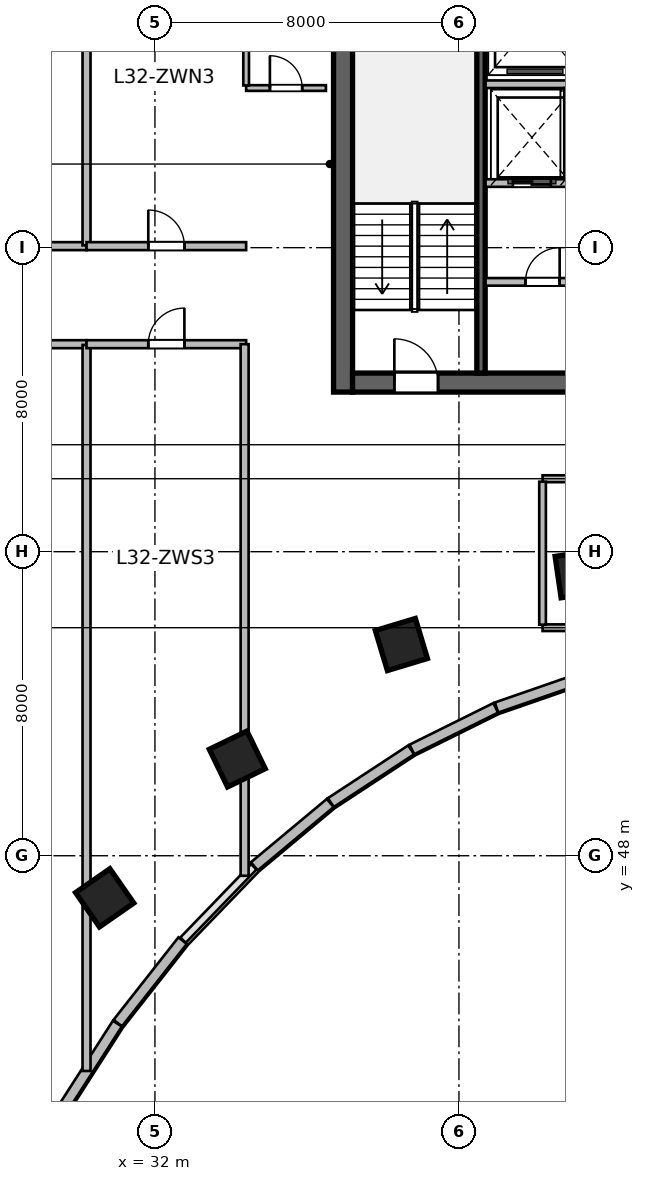
"""IFC4 building model, lengths in metres.
Left out: names, types, materials, properties, quantities, classifications, styles, units other than length and angle.
Written with IfcOpenShell. Run it as: python <this file> out.ifc"""

import sys

from ifc_helpers import new_model, si_unit, direction, frame, frame_2d, origin, origin_2d, place, context, subcontext, project, spatial, rectangle, extrude, source, transform, mapped, element, fill, save


model = new_model("IFC4")
c1 = context("Model", 3, precision=1e-05, world=origin(), true_north=direction((0.0, 1.0)))
c2 = subcontext(c1, "Body", "Model", "MODEL_VIEW")
j1 = project(units=[si_unit("LENGTHUNIT", "METRE"), si_unit("PLANEANGLEUNIT", "RADIAN")], contexts=[c1])
p1 = place(None, origin())
s1 = spatial("IfcSite", under=j1, at=p1, CompositionType="ELEMENT")
p2 = place(p1, origin())
s2 = spatial("IfcBuilding", under=s1, at=p2, CompositionType="ELEMENT")
p3 = place(p2, frame((0.0, 0.0, 135.0)))
s3 = spatial("IfcBuildingStorey", under=s2, at=p3, CompositionType="ELEMENT", Elevation=135.0)
m1 = source(origin(), c2, "Body", "SweptSolid", [
    extrude(rectangle(XDim=12.0, YDim=0.5, at=frame_2d((6.0, 0.0))), origin(), (0.0, 0.0, 1.0), 3.9),
])
p4 = place(p3, frame((36.95, 60.2, 0.0), z_axis=(0.0, 0.0, 1.0), x_axis=(0.0, 1.0, 0.0)))
e1 = element("IfcWall", 1, at=p4, inside=s3, PredefinedType="SHEAR", context=c2, shape_type="MappedRepresentation", body=[
    mapped(m1, transform((0.0, 0.0, 0.0), scale=1.0)),
])
m2 = source(origin(), c2, "Body", "SweptSolid", [
    extrude(rectangle(XDim=21.6, YDim=0.5, at=frame_2d((10.8, 0.0))), origin(), (0.0, 0.0, 1.0), 3.9),
])
p5 = place(p3, frame((37.2, 60.45, 0.0), z_axis=(0.0, 0.0, 1.0), x_axis=(1.0, 0.0, 0.0)))
e2 = element("IfcWall", 2, at=p5, inside=s3, PredefinedType="SHEAR", context=c2, shape_type="MappedRepresentation", body=[
    mapped(m2, transform((0.0, 0.0, 0.0), scale=1.0)),
])
p6 = place(p5, frame((1.1, 0.0, 0.0)))
e3 = element("IfcOpeningElement", 3, at=p6, cuts=e2, PredefinedType="OPENING", context=c2, shape_type="SweptSolid", body=[
    extrude(rectangle(XDim=1.15, YDim=2.15, at=frame_2d((0.575, 1.075))), frame((0.0, 0.26, 0.0), z_axis=(0.0, -1.0, 0.0), x_axis=(1.0, 0.0, 0.0)), (0.0, 0.0, 1.0), 0.52),
])
p7 = place(p5, frame((19.5, 0.0, 0.0)))
e4 = element("IfcOpeningElement", 4, at=p7, cuts=e2, PredefinedType="OPENING", context=c2, shape_type="SweptSolid", body=[
    extrude(rectangle(XDim=0.9, YDim=2.1, at=frame_2d((0.45, 1.05))), frame((0.0, 0.26, 0.0), z_axis=(0.0, -1.0, 0.0), x_axis=(1.0, 0.0, 0.0)), (0.0, 0.0, 1.0), 0.52),
])
p8 = place(p5, frame((12.02, 0.0, 0.0)))
e5 = element("IfcOpeningElement", 5, at=p8, cuts=e2, PredefinedType="OPENING", context=c2, shape_type="SweptSolid", body=[
    extrude(rectangle(XDim=1.6, YDim=2.15, at=frame_2d((0.8, 1.075))), frame((0.0, 0.26, 0.0), z_axis=(0.0, -1.0, 0.0), x_axis=(1.0, 0.0, 0.0)), (0.0, 0.0, 1.0), 0.52),
])
m3 = source(origin(), c2, "Body", "SweptSolid", [
    extrude(rectangle(XDim=11.0, YDim=0.22, at=frame_2d((5.5, 0.0))), origin(), (0.0, 0.0, 1.0), 3.9),
])
p9 = place(p3, frame((40.58, 60.7, 0.0), z_axis=(0.0, 0.0, 1.0), x_axis=(0.0, 1.0, 0.0)))
e6 = element("IfcWall", 6, at=p9, inside=s3, PredefinedType="SHEAR", context=c2, shape_type="MappedRepresentation", body=[
    mapped(m3, transform((0.0, 0.0, 0.0), scale=1.0)),
])
m4 = source(origin(), c2, "Body", "SweptSolid", [
    extrude(rectangle(XDim=1.1, YDim=1.1, at=origin_2d()), origin(), (0.0, 0.0, 1.0), 3.9),
])
for number, where, z_axis, x_axis in (
    (7, (30.677, 46.892, 0.0), (0.0, 0.0, 1.0), (-0.571, 0.821, 0.0)),
    (8, (34.166, 50.545, 0.0), (0.0, 0.0, 1.0), (-0.436, 0.9, 0.0)),
    (9, (38.485, 53.558, 0.0), (0.0, 0.0, 1.0), (-0.289, 0.957, 0.0)),
    (10, (43.154, 55.411, 0.0), (0.0, 0.0, 1.0), (-0.143, 0.99, 0.0)),
):
    element("IfcColumn", number, at=place(p3, frame(where, z_axis=z_axis, x_axis=x_axis)), inside=s3, PredefinedType="COLUMN", context=c2, shape_type="MappedRepresentation", body=[
        mapped(m4, transform((0.0, 0.0, 0.0), scale=1.0)),
    ])
m5 = source(origin(), c2, "Body", "SweptSolid", [
    extrude(rectangle(XDim=2.411, YDim=0.28, at=frame_2d((1.205, 0.0))), origin(), (0.0, 0.0, 1.0), 3.65),
])
p10 = place(p3, frame((43.266, 52.689, 0.0), z_axis=(0.0, 0.0, 1.0), x_axis=(-0.944880068161, -0.327416640982, 0.0)))
e11 = element("IfcWall", 11, at=p10, inside=s3, PredefinedType="SOLIDWALL", context=c2, shape_type="MappedRepresentation", body=[
    mapped(m5, transform((0.0, 0.0, 0.0), scale=1.0)),
])
m6 = source(origin(), c2, "Body", "SweptSolid", [
    extrude(rectangle(XDim=2.462, YDim=0.28, at=frame_2d((1.231, 0.0))), origin(), (0.0, 0.0, 1.0), 3.65),
])
p11 = place(p3, frame((40.967, 51.891, 0.0), z_axis=(0.0, 0.0, 1.0), x_axis=(-0.8959882207, -0.444077817917, 0.0)))
e12 = element("IfcWall", 12, at=p11, inside=s3, PredefinedType="SOLIDWALL", context=c2, shape_type="MappedRepresentation", body=[
    mapped(m6, transform((0.0, 0.0, 0.0), scale=1.0)),
])
m7 = source(origin(), c2, "Body", "SweptSolid", [
    extrude(rectangle(XDim=2.527, YDim=0.28, at=frame_2d((1.264, 0.0))), origin(), (0.0, 0.0, 1.0), 3.65),
])
p12 = place(p3, frame((38.742, 50.786, 0.0), z_axis=(0.0, 0.0, 1.0), x_axis=(-0.836011905051, -0.548711303523, 0.0)))
e13 = element("IfcWall", 13, at=p12, inside=s3, PredefinedType="SOLIDWALL", context=c2, shape_type="MappedRepresentation", body=[
    mapped(m7, transform((0.0, 0.0, 0.0), scale=1.0)),
])
m8 = source(origin(), c2, "Body", "SweptSolid", [
    extrude(rectangle(XDim=2.601, YDim=0.28, at=frame_2d((1.3, 0.0))), origin(), (0.0, 0.0, 1.0), 3.65),
])
p13 = place(p3, frame((36.613, 49.387, 0.0), z_axis=(0.0, 0.0, 1.0), x_axis=(-0.76796730295, -0.640489048775, 0.0)))
e14 = element("IfcWall", 14, at=p13, inside=s3, PredefinedType="SOLIDWALL", context=c2, shape_type="MappedRepresentation", body=[
    mapped(m8, transform((0.0, 0.0, 0.0), scale=1.0)),
])
m9 = source(origin(), c2, "Body", "SweptSolid", [
    extrude(rectangle(XDim=2.76, YDim=0.28, at=frame_2d((1.38, 0.0))), origin(), (0.0, 0.0, 1.0), 3.65),
])
p14 = place(p3, frame((32.728, 45.766, 0.0), z_axis=(0.0, 0.0, 1.0), x_axis=(-0.618180818641, -0.786035925047, 0.0)))
e15 = element("IfcWall", 15, at=p14, inside=s3, PredefinedType="SOLIDWALL", context=c2, shape_type="MappedRepresentation", body=[
    mapped(m9, transform((0.0, 0.0, 0.0), scale=1.0)),
])
m10 = source(origin(), c2, "Body", "SweptSolid", [
    extrude(rectangle(XDim=2.84, YDim=0.28, at=frame_2d((1.42, 0.0))), origin(), (0.0, 0.0, 1.0), 3.65),
])
p15 = place(p3, frame((31.011, 43.582, 0.0), z_axis=(0.0, 0.0, 1.0), x_axis=(-0.540214368057, -0.841527442538, 0.0)))
e16 = element("IfcWall", 16, at=p15, inside=s3, PredefinedType="SOLIDWALL", context=c2, shape_type="MappedRepresentation", body=[
    mapped(m10, transform((0.0, 0.0, 0.0), scale=1.0)),
])
m11 = source(origin(), c2, "Body", "SweptSolid", [
    extrude(rectangle(XDim=8.8, YDim=0.2, at=frame_2d((4.4, 0.0))), origin(), (0.0, 0.0, 1.0), 3.65),
])
p16 = place(p3, frame((40.7, 68.3, 0.0), z_axis=(0.0, 0.0, 1.0), x_axis=(1.0, 0.0, 0.0)))
e17 = element("IfcWall", 17, at=p16, inside=s3, PredefinedType="SOLIDWALL", context=c2, shape_type="MappedRepresentation", body=[
    mapped(m11, transform((0.0, 0.0, 0.0), scale=1.0)),
])
m12 = source(origin(), c2, "Body", "SweptSolid", [
    extrude(rectangle(XDim=8.02, YDim=0.2, at=frame_2d((4.01, 0.0))), origin(), (0.0, 0.0, 1.0), 3.65),
])
p17 = place(p3, frame((40.7, 63.1, 0.0), z_axis=(0.0, 0.0, 1.0), x_axis=(1.0, 0.0, 0.0)))
e18 = element("IfcWall", 18, at=p17, inside=s3, PredefinedType="SOLIDWALL", context=c2, shape_type="MappedRepresentation", body=[
    mapped(m12, transform((0.0, 0.0, 0.0), scale=1.0)),
])
p18 = place(p17, frame((1.05, 0.0, 0.0)))
e19 = element("IfcOpeningElement", 19, at=p18, cuts=e18, PredefinedType="OPENING", context=c2, shape_type="SweptSolid", body=[
    extrude(rectangle(XDim=0.9, YDim=2.1, at=frame_2d((0.45, 1.05))), frame((0.0, 0.11, 0.0), z_axis=(0.0, -1.0, 0.0), x_axis=(1.0, 0.0, 0.0)), (0.0, 0.0, 1.0), 0.22),
])
p19 = place(p17, frame((4.99, 0.0, 0.0)))
e20 = element("IfcOpeningElement", 20, at=p19, cuts=e18, PredefinedType="OPENING", context=c2, shape_type="SweptSolid", body=[
    extrude(rectangle(XDim=0.9, YDim=2.1, at=frame_2d((0.45, 1.05))), frame((0.0, 0.11, 0.0), z_axis=(0.0, -1.0, 0.0), x_axis=(1.0, 0.0, 0.0)), (0.0, 0.0, 1.0), 0.22),
])
p20 = place(p3, frame((40.7, 65.7, 0.0), z_axis=(0.0, 0.0, 1.0), x_axis=(1.0, 0.0, 0.0)))
e21 = element("IfcWall", 21, at=p20, inside=s3, PredefinedType="SOLIDWALL", context=c2, shape_type="MappedRepresentation", body=[
    mapped(m11, transform((0.0, 0.0, 0.0), scale=1.0)),
])
p21 = place(p20, frame((0.72, 0.0, 0.0)))
e22 = element("IfcOpeningElement", 22, at=p21, cuts=e21, PredefinedType="OPENING", context=c2, shape_type="SweptSolid", body=[
    extrude(rectangle(XDim=1.0, YDim=2.15, at=frame_2d((0.5, 1.075))), frame((0.0, 0.11, 0.0), z_axis=(0.0, -1.0, 0.0), x_axis=(1.0, 0.0, 0.0)), (0.0, 0.0, 1.0), 0.22),
])
p22 = place(p20, frame((2.62, 0.0, 0.0)))
e23 = element("IfcOpeningElement", 23, at=p22, cuts=e21, PredefinedType="OPENING", context=c2, shape_type="SweptSolid", body=[
    extrude(rectangle(XDim=1.0, YDim=2.15, at=frame_2d((0.5, 1.075))), frame((0.0, 0.11, 0.0), z_axis=(0.0, -1.0, 0.0), x_axis=(1.0, 0.0, 0.0)), (0.0, 0.0, 1.0), 0.22),
])
p23 = place(p20, frame((4.55, 0.0, 0.0)))
e24 = element("IfcOpeningElement", 24, at=p23, cuts=e21, PredefinedType="OPENING", context=c2, shape_type="SweptSolid", body=[
    extrude(rectangle(XDim=1.0, YDim=2.15, at=frame_2d((0.5, 1.075))), frame((0.0, 0.11, 0.0), z_axis=(0.0, -1.0, 0.0), x_axis=(1.0, 0.0, 0.0)), (0.0, 0.0, 1.0), 0.22),
])
p24 = place(p20, frame((6.55, 0.0, 0.0)))
e25 = element("IfcOpeningElement", 25, at=p24, cuts=e21, PredefinedType="OPENING", context=c2, shape_type="SweptSolid", body=[
    extrude(rectangle(XDim=1.0, YDim=2.15, at=frame_2d((0.5, 1.075))), frame((0.0, 0.11, 0.0), z_axis=(0.0, -1.0, 0.0), x_axis=(1.0, 0.0, 0.0)), (0.0, 0.0, 1.0), 0.22),
])
m13 = source(origin(), c2, "Body", "SweptSolid", [
    extrude(rectangle(XDim=2.4, YDim=0.2, at=frame_2d((1.2, 0.0))), origin(), (0.0, 0.0, 1.0), 3.65),
])
p25 = place(p3, frame((42.87, 65.8, 0.0), z_axis=(0.0, 0.0, 1.0), x_axis=(0.0, 1.0, 0.0)))
e26 = element("IfcWall", 26, at=p25, inside=s3, PredefinedType="SOLIDWALL", context=c2, shape_type="MappedRepresentation", body=[
    mapped(m13, transform((0.0, 0.0, 0.0), scale=1.0)),
])
m14 = source(origin(), c2, "Body", "SweptSolid", [
    extrude(rectangle(XDim=2.1, YDim=0.15, at=frame_2d((1.05, 0.0))), origin(), (0.0, 0.0, 1.0), 3.65),
])
p26 = place(p3, frame((34.4, 68.2, 0.0), z_axis=(0.0, 0.0, 1.0), x_axis=(1.0, 0.0, 0.0)))
e27 = element("IfcWall", 27, at=p26, inside=s3, PredefinedType="PARTITIONING", context=c2, shape_type="MappedRepresentation", body=[
    mapped(m14, transform((0.0, 0.0, 0.0), scale=1.0)),
])
p27 = place(p26, frame((0.625, 0.0, 0.0)))
e28 = element("IfcOpeningElement", 28, at=p27, cuts=e27, PredefinedType="OPENING", context=c2, shape_type="SweptSolid", body=[
    extrude(rectangle(XDim=0.85, YDim=2.1, at=frame_2d((0.425, 1.05))), frame((0.0, 0.085, 0.0), z_axis=(0.0, -1.0, 0.0), x_axis=(1.0, 0.0, 0.0)), (0.0, 0.0, 1.0), 0.17),
])
m15 = source(origin(), c2, "Body", "SweptSolid", [
    extrude(rectangle(XDim=3.845, YDim=0.15, at=frame_2d((1.922, 0.0))), origin(), (0.0, 0.0, 1.0), 3.65),
])
p28 = place(p3, frame((34.4, 68.268, 0.0), z_axis=(0.0, 0.0, 1.0), x_axis=(0.0, 1.0, 0.0)))
e29 = element("IfcWall", 29, at=p28, inside=s3, PredefinedType="PARTITIONING", context=c2, shape_type="MappedRepresentation", body=[
    mapped(m15, transform((0.0, 0.0, 0.0), scale=1.0)),
])
m16 = source(origin(), c2, "Body", "SweptSolid", [
    extrude(rectangle(XDim=4.176, YDim=0.175, at=frame_2d((2.088, 0.0))), origin(), (0.0, 0.0, 1.0), 3.65),
])
p29 = place(p3, frame((42.2, 54.0, 0.0), z_axis=(0.0, 0.0, 1.0), x_axis=(1.0, 0.0, 0.0)))
e30 = element("IfcWall", 30, at=p29, inside=s3, PredefinedType="PARTITIONING", context=c2, shape_type="MappedRepresentation", body=[
    mapped(m16, transform((0.0, 0.0, 0.0), scale=1.0)),
])
m17 = source(origin(), c2, "Body", "SweptSolid", [
    extrude(rectangle(XDim=4.176, YDim=0.18, at=frame_2d((2.088, 0.0))), origin(), (0.0, 0.0, 1.0), 3.65),
])
p30 = place(p3, frame((42.2, 57.92, 0.0), z_axis=(0.0, 0.0, 1.0), x_axis=(1.0, 0.0, 0.0)))
e31 = element("IfcWall", 31, at=p30, inside=s3, PredefinedType="PLUMBINGWALL", context=c2, shape_type="MappedRepresentation", body=[
    mapped(m17, transform((0.0, 0.0, 0.0), scale=1.0)),
])
p31 = place(p30, frame((1.638, 0.0, 0.0)))
e32 = element("IfcOpeningElement", 32, at=p31, cuts=e31, PredefinedType="OPENING", context=c2, shape_type="SweptSolid", body=[
    extrude(rectangle(XDim=0.9, YDim=2.08, at=frame_2d((0.45, 1.04))), frame((0.0, 0.1, 0.0), z_axis=(0.0, -1.0, 0.0), x_axis=(1.0, 0.0, 0.0)), (0.0, 0.0, 1.0), 0.2),
])
m18 = source(origin(), c2, "Body", "SweptSolid", [
    extrude(rectangle(XDim=3.763, YDim=0.175, at=frame_2d((1.881, 0.0))), origin(), (0.0, 0.0, 1.0), 3.65),
])
p32 = place(p3, frame((42.2, 54.079, 0.0), z_axis=(0.0, 0.0, 1.0), x_axis=(0.0, 1.0, 0.0)))
e33 = element("IfcWall", 33, at=p32, inside=s3, PredefinedType="PARTITIONING", context=c2, shape_type="MappedRepresentation", body=[
    mapped(m18, transform((0.0, 0.0, 0.0), scale=1.0)),
])
m19 = source(origin(), c2, "Body", "SweptSolid", [
    extrude(rectangle(XDim=4.0, YDim=0.21, at=frame_2d((2.0, 0.0))), origin(), (0.0, 0.0, 1.0), 3.65),
])
p33 = place(p3, frame((26.2, 64.04, 0.0), z_axis=(0.0, 0.0, 1.0), x_axis=(1.0, 0.0, 0.0)))
e34 = element("IfcWall", 34, at=p33, inside=s3, PredefinedType="PARTITIONING", context=c2, shape_type="MappedRepresentation", body=[
    mapped(m19, transform((0.0, 0.0, 0.0), scale=1.0)),
])
p34 = place(p33, frame((1.525, 0.0, 0.0)))
e35 = element("IfcOpeningElement", 35, at=p34, cuts=e34, PredefinedType="OPENING", context=c2, shape_type="SweptSolid", body=[
    extrude(rectangle(XDim=0.95, YDim=2.1, at=frame_2d((0.475, 1.05))), frame((0.0, 0.115, 0.0), z_axis=(0.0, -1.0, 0.0), x_axis=(1.0, 0.0, 0.0)), (0.0, 0.0, 1.0), 0.23),
])
m20 = source(origin(), c2, "Body", "SweptSolid", [
    extrude(rectangle(XDim=9.736, YDim=0.21, at=frame_2d((4.868, 0.0))), origin(), (0.0, 0.0, 1.0), 3.65),
])
p35 = place(p3, frame((30.2, 64.06, 0.0), z_axis=(0.0, 0.0, 1.0), x_axis=(0.0, 1.0, 0.0)))
e36 = element("IfcWall", 36, at=p35, inside=s3, PredefinedType="PARTITIONING", context=c2, shape_type="MappedRepresentation", body=[
    mapped(m20, transform((0.0, 0.0, 0.0), scale=1.0)),
])
m21 = source(origin(), c2, "Body", "SweptSolid", [
    extrude(rectangle(XDim=4.2, YDim=0.21, at=frame_2d((2.1, 0.0))), origin(), (0.0, 0.0, 1.0), 3.65),
])
p36 = place(p3, frame((30.2, 64.04, 0.0), z_axis=(0.0, 0.0, 1.0), x_axis=(1.0, 0.0, 0.0)))
e37 = element("IfcWall", 37, at=p36, inside=s3, PredefinedType="PARTITIONING", context=c2, shape_type="MappedRepresentation", body=[
    mapped(m21, transform((0.0, 0.0, 0.0), scale=1.0)),
])
p37 = place(p36, frame((1.625, 0.0, 0.0)))
e38 = element("IfcOpeningElement", 38, at=p37, cuts=e37, PredefinedType="OPENING", context=c2, shape_type="SweptSolid", body=[
    extrude(rectangle(XDim=0.95, YDim=2.1, at=frame_2d((0.475, 1.05))), frame((0.0, 0.115, 0.0), z_axis=(0.0, -1.0, 0.0), x_axis=(1.0, 0.0, 0.0)), (0.0, 0.0, 1.0), 0.23),
])
p38 = place(p3, frame((26.2, 61.46, 0.0), z_axis=(0.0, 0.0, 1.0), x_axis=(1.0, 0.0, 0.0)))
e39 = element("IfcWall", 39, at=p38, inside=s3, PredefinedType="PARTITIONING", context=c2, shape_type="MappedRepresentation", body=[
    mapped(m19, transform((0.0, 0.0, 0.0), scale=1.0)),
])
p39 = place(p38, frame((1.525, 0.0, 0.0)))
e40 = element("IfcOpeningElement", 40, at=p39, cuts=e39, PredefinedType="OPENING", context=c2, shape_type="SweptSolid", body=[
    extrude(rectangle(XDim=0.95, YDim=2.1, at=frame_2d((0.475, 1.05))), frame((0.0, 0.115, 0.0), z_axis=(0.0, -1.0, 0.0), x_axis=(1.0, 0.0, 0.0)), (0.0, 0.0, 1.0), 0.23),
])
m22 = source(origin(), c2, "Body", "SweptSolid", [
    extrude(rectangle(XDim=19.103, YDim=0.21, at=frame_2d((9.552, 0.0))), origin(), (0.0, 0.0, 1.0), 2.942),
])
p40 = place(p3, frame((30.2, 42.337, 0.0), z_axis=(0.0, 0.0, 1.0), x_axis=(0.0, 1.0, 0.0)))
e41 = element("IfcWall", 41, at=p40, inside=s3, PredefinedType="PARTITIONING", context=c2, shape_type="MappedRepresentation", body=[
    mapped(m22, transform((0.0, 0.0, 0.0), scale=1.0)),
])
p41 = place(p3, frame((30.2, 61.46, 0.0), z_axis=(0.0, 0.0, 1.0), x_axis=(1.0, 0.0, 0.0)))
e42 = element("IfcWall", 42, at=p41, inside=s3, PredefinedType="PARTITIONING", context=c2, shape_type="MappedRepresentation", body=[
    mapped(m21, transform((0.0, 0.0, 0.0), scale=1.0)),
])
p42 = place(p41, frame((1.625, 0.0, 0.0)))
e43 = element("IfcOpeningElement", 43, at=p42, cuts=e42, PredefinedType="OPENING", context=c2, shape_type="SweptSolid", body=[
    extrude(rectangle(XDim=0.95, YDim=2.1, at=frame_2d((0.475, 1.05))), frame((0.0, 0.115, 0.0), z_axis=(0.0, -1.0, 0.0), x_axis=(1.0, 0.0, 0.0)), (0.0, 0.0, 1.0), 0.23),
])
m23 = source(origin(), c2, "Body", "SweptSolid", [
    extrude(rectangle(XDim=13.988, YDim=0.21, at=frame_2d((6.994, 0.0))), origin(), (0.0, 0.0, 1.0), 3.65),
])
p43 = place(p3, frame((34.36, 47.472, 0.0), z_axis=(0.0, 0.0, 1.0), x_axis=(0.0, 1.0, 0.0)))
e44 = element("IfcWall", 44, at=p43, inside=s3, PredefinedType="PARTITIONING", context=c2, shape_type="MappedRepresentation", body=[
    mapped(m23, transform((0.0, 0.0, 0.0), scale=1.0)),
])
m24 = source(origin(), c2, "Body", "SweptSolid", [
    extrude(rectangle(XDim=1.15, YDim=2.15, at=frame_2d((0.575, 1.075))), frame((0.0, 0.025, 0.0), z_axis=(0.0, -1.0, 0.0), x_axis=(1.0, 0.0, 0.0)), (0.0, 0.0, 1.0), 0.05),
])
p44 = place(p6, origin())
e45 = element("IfcDoor", 45, at=p44, inside=s3, OperationType="SINGLE_SWING_LEFT", PredefinedType="DOOR", context=c2, shape_type="MappedRepresentation", body=[
    mapped(m24, transform((0.0, 0.0, 0.0), scale=1.0)),
])
fill(e3, e45)
m25 = source(origin(), c2, "Body", "SweptSolid", [
    extrude(rectangle(XDim=0.9, YDim=2.1, at=frame_2d((0.45, 1.05))), frame((0.0, 0.025, 0.0), z_axis=(0.0, -1.0, 0.0), x_axis=(1.0, 0.0, 0.0)), (0.0, 0.0, 1.0), 0.05),
])
p45 = place(p18, origin())
e46 = element("IfcDoor", 46, at=p45, inside=s3, OperationType="SINGLE_SWING_RIGHT", PredefinedType="DOOR", context=c2, shape_type="MappedRepresentation", body=[
    mapped(m25, transform((0.0, 0.0, 0.0), scale=1.0)),
])
fill(e19, e46)
m26 = source(origin(), c2, "Body", "SweptSolid", [
    extrude(rectangle(XDim=1.0, YDim=2.15, at=frame_2d((0.5, 1.075))), frame((0.0, 0.025, 0.0), z_axis=(0.0, -1.0, 0.0), x_axis=(1.0, 0.0, 0.0)), (0.0, 0.0, 1.0), 0.05),
])
p46 = place(p21, origin())
e47 = element("IfcDoor", 47, at=p46, inside=s3, OperationType="DOUBLE_DOOR_SLIDING", PredefinedType="DOOR", context=c2, shape_type="MappedRepresentation", body=[
    mapped(m26, transform((0.0, 0.0, 0.0), scale=1.0)),
])
fill(e22, e47)
m27 = source(origin(), c2, "Body", "SweptSolid", [
    extrude(rectangle(XDim=0.85, YDim=2.1, at=frame_2d((0.425, 1.05))), frame((0.0, 0.025, 0.0), z_axis=(0.0, -1.0, 0.0), x_axis=(1.0, 0.0, 0.0)), (0.0, 0.0, 1.0), 0.05),
])
p47 = place(p27, origin())
e48 = element("IfcDoor", 48, at=p47, inside=s3, OperationType="SINGLE_SWING_LEFT", PredefinedType="DOOR", context=c2, shape_type="MappedRepresentation", body=[
    mapped(m27, transform((0.0, 0.0, 0.0), scale=1.0)),
])
fill(e28, e48)
m28 = source(origin(), c2, "Body", "SweptSolid", [
    extrude(rectangle(XDim=0.95, YDim=2.1, at=frame_2d((0.475, 1.05))), frame((0.0, 0.025, 0.0), z_axis=(0.0, -1.0, 0.0), x_axis=(1.0, 0.0, 0.0)), (0.0, 0.0, 1.0), 0.05),
])
p48 = place(p37, origin())
e49 = element("IfcDoor", 49, at=p48, inside=s3, OperationType="SINGLE_SWING_LEFT", PredefinedType="DOOR", context=c2, shape_type="MappedRepresentation", body=[
    mapped(m28, transform((0.0, 0.0, 0.0), scale=1.0)),
])
fill(e38, e49)
p49 = place(p42, origin())
e50 = element("IfcDoor", 50, at=p49, inside=s3, OperationType="SINGLE_SWING_RIGHT", PredefinedType="DOOR", context=c2, shape_type="MappedRepresentation", body=[
    mapped(m28, transform((0.0, 0.0, 0.0), scale=1.0)),
])
fill(e43, e50)
save(model, sys.argv[1])
